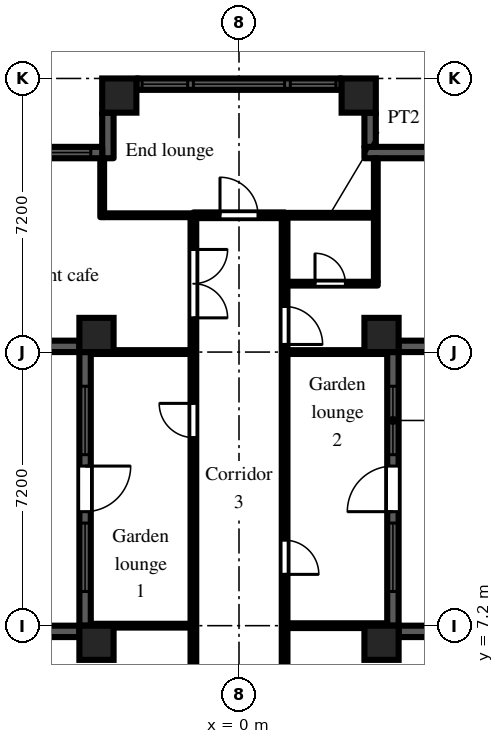
"""IFC4 building model, lengths in metres.
Left out: names, types, materials, properties, quantities, classifications, styles, units other than length and angle.
Written with IfcOpenShell. Run it as: python <this file> out.ifc"""

import sys

from ifc_helpers import new_model, si_unit, direction, frame, frame_2d, origin, origin_2d, place, context, subcontext, project, spatial, rectangle, extrude, element, fill, save


model = new_model("IFC4")
c1 = context("Model", 3, precision=1e-05, world=origin(), true_north=direction((0.0, 1.0)))
c2 = subcontext(c1, "Body", "Model", "MODEL_VIEW")
j1 = project(units=[si_unit("LENGTHUNIT", "METRE"), si_unit("PLANEANGLEUNIT", "RADIAN")], contexts=[c1])
p1 = place(None, origin())
s1 = spatial("IfcSite", under=j1, at=p1, CompositionType="ELEMENT")
p2 = place(p1, origin())
s2 = spatial("IfcBuilding", under=s1, at=p2, CompositionType="ELEMENT")
p3 = place(p2, frame((0.0, 0.0, 84.9)))
s3 = spatial("IfcBuildingStorey", under=s2, at=p3, CompositionType="ELEMENT", Elevation=84.9)
for number, where, z_axis, x_axis in (
    (1, (-3.75, 6.75, 0.0), (0.0, 0.0, 1.0), (1.0, 0.0, 0.0)),
    (2, (-3.75, 14.85, 0.0), (0.0, 0.0, 1.0), (1.0, 0.0, 0.0)),
    (3, (-3.15, 21.15, 0.0), (0.0, 0.0, 1.0), (1.0, 0.0, 0.0)),
    (4, (3.15, 21.15, 0.0), (0.0, 0.0, 1.0), (1.0, 0.0, 0.0)),
    (5, (3.75, 6.75, 0.0), (0.0, 0.0, 1.0), (1.0, 0.0, 0.0)),
    (6, (3.75, 14.85, 0.0), (0.0, 0.0, 1.0), (1.0, 0.0, 0.0)),
):
    element("IfcColumn", number, at=place(p3, frame(where, z_axis=z_axis, x_axis=x_axis)), inside=s3, PredefinedType="COLUMN", context=c2, shape_type="SweptSolid", body=[
        extrude(rectangle(XDim=0.9, YDim=0.9, at=origin_2d()), origin(), (0.0, 0.0, 1.0), 3.0),
    ])
p4 = place(p3, frame((7.2, 7.05, 0.0), z_axis=(0.0, 0.0, 1.0), x_axis=(-1.0, 0.0, 0.0)))
e7 = element("IfcWall", 7, at=p4, inside=s3, PredefinedType="SOLIDWALL", context=c2, shape_type="SweptSolid", body=[
    extrude(rectangle(XDim=3.0, YDim=0.3, at=frame_2d((1.5, 0.0))), origin(), (0.0, 0.0, 1.0), 2.1),
])
p5 = place(p3, frame((4.05, 7.2, 0.0), z_axis=(0.0, 0.0, 1.0), x_axis=(0.0, 1.0, 0.0)))
e8 = element("IfcWall", 8, at=p5, inside=s3, PredefinedType="SOLIDWALL", context=c2, shape_type="SweptSolid", body=[
    extrude(rectangle(XDim=7.2, YDim=0.3, at=frame_2d((3.6, 0.0))), origin(), (0.0, 0.0, 1.0), 2.1),
])
p6 = place(p5, frame((3.0, 0.0, 0.0)))
e9 = element("IfcOpeningElement", 9, at=p6, cuts=e8, PredefinedType="OPENING", context=c2, shape_type="SweptSolid", body=[
    extrude(rectangle(XDim=1.2, YDim=2.05, at=frame_2d((0.6, 1.025))), frame((0.0, 0.16, 0.0), z_axis=(0.0, -1.0, 0.0), x_axis=(1.0, 0.0, 0.0)), (0.0, 0.0, 1.0), 0.32),
])
p7 = place(p5, frame((0.9, 0.0, 0.2)))
e10 = element("IfcOpeningElement", 10, at=p7, cuts=e8, PredefinedType="OPENING", context=c2, shape_type="SweptSolid", body=[
    extrude(rectangle(XDim=1.8, YDim=1.85, at=frame_2d((0.9, 0.925))), frame((0.0, 0.16, 0.0), z_axis=(0.0, -1.0, 0.0), x_axis=(1.0, 0.0, 0.0)), (0.0, 0.0, 1.0), 0.32),
])
p8 = place(p5, frame((4.5, 0.0, 0.2)))
e11 = element("IfcOpeningElement", 11, at=p8, cuts=e8, PredefinedType="OPENING", context=c2, shape_type="SweptSolid", body=[
    extrude(rectangle(XDim=1.8, YDim=1.85, at=frame_2d((0.9, 0.925))), frame((0.0, 0.16, 0.0), z_axis=(0.0, -1.0, 0.0), x_axis=(1.0, 0.0, 0.0)), (0.0, 0.0, 1.0), 0.32),
])
p9 = place(p3, frame((4.2, 14.55, 0.0), z_axis=(0.0, 0.0, 1.0), x_axis=(1.0, 0.0, 0.0)))
e12 = element("IfcWall", 12, at=p9, inside=s3, PredefinedType="SOLIDWALL", context=c2, shape_type="SweptSolid", body=[
    extrude(rectangle(XDim=2.1, YDim=0.3, at=frame_2d((1.05, 0.0))), origin(), (0.0, 0.0, 1.0), 2.1),
])
p10 = place(p3, frame((5.1, 19.65, 0.0), z_axis=(0.0, 0.0, 1.0), x_axis=(-1.0, 0.0, 0.0)))
e13 = element("IfcWall", 13, at=p10, inside=s3, PredefinedType="SOLIDWALL", context=c2, shape_type="SweptSolid", body=[
    extrude(rectangle(XDim=1.8, YDim=0.3, at=frame_2d((0.9, 0.0))), origin(), (0.0, 0.0, 1.0), 2.575),
])
p11 = place(p3, frame((3.45, 19.8, 0.0), z_axis=(0.0, 0.0, 1.0), x_axis=(0.0, 1.0, 0.0)))
e14 = element("IfcWall", 14, at=p11, inside=s3, PredefinedType="SOLIDWALL", context=c2, shape_type="SweptSolid", body=[
    extrude(rectangle(XDim=0.9, YDim=0.3, at=frame_2d((0.45, 0.0))), origin(), (0.0, 0.0, 1.0), 2.575),
])
p12 = place(p3, frame((2.7, 21.45, 0.0), z_axis=(0.0, 0.0, 1.0), x_axis=(-1.0, 0.0, 0.0)))
e15 = element("IfcWall", 15, at=p12, inside=s3, PredefinedType="SOLIDWALL", context=c2, shape_type="SweptSolid", body=[
    extrude(rectangle(XDim=5.4, YDim=0.3, at=frame_2d((2.7, 0.0))), origin(), (0.0, 0.0, 1.0), 2.1),
])
p13 = place(p12, frame((1.5, 0.0, 0.2)))
e16 = element("IfcOpeningElement", 16, at=p13, cuts=e15, PredefinedType="OPENING", context=c2, shape_type="SweptSolid", body=[
    extrude(rectangle(XDim=2.4, YDim=1.85, at=frame_2d((1.2, 0.925))), frame((0.0, 0.16, 0.0), z_axis=(0.0, -1.0, 0.0), x_axis=(1.0, 0.0, 0.0)), (0.0, 0.0, 1.0), 0.32),
])
p14 = place(p12, frame((0.15, 0.0, 0.2)))
e17 = element("IfcOpeningElement", 17, at=p14, cuts=e15, PredefinedType="OPENING", context=c2, shape_type="SweptSolid", body=[
    extrude(rectangle(XDim=1.2, YDim=1.85, at=frame_2d((0.6, 0.925))), frame((0.0, 0.16, 0.0), z_axis=(0.0, -1.0, 0.0), x_axis=(1.0, 0.0, 0.0)), (0.0, 0.0, 1.0), 0.32),
])
p15 = place(p12, frame((4.05, 0.0, 0.2)))
e18 = element("IfcOpeningElement", 18, at=p15, cuts=e15, PredefinedType="OPENING", context=c2, shape_type="SweptSolid", body=[
    extrude(rectangle(XDim=1.2, YDim=1.85, at=frame_2d((0.6, 0.925))), frame((0.0, 0.16, 0.0), z_axis=(0.0, -1.0, 0.0), x_axis=(1.0, 0.0, 0.0)), (0.0, 0.0, 1.0), 0.32),
])
p16 = place(p3, frame((-3.45, 20.7, 0.0), z_axis=(0.0, 0.0, 1.0), x_axis=(0.0, -1.0, 0.0)))
e19 = element("IfcWall", 19, at=p16, inside=s3, PredefinedType="SOLIDWALL", context=c2, shape_type="SweptSolid", body=[
    extrude(rectangle(XDim=1.2, YDim=0.3, at=frame_2d((0.6, 0.0))), origin(), (0.0, 0.0, 1.0), 2.575),
])
p17 = place(p3, frame((-3.6, 19.65, 0.0), z_axis=(0.0, 0.0, 1.0), x_axis=(-1.0, 0.0, 0.0)))
e20 = element("IfcWall", 20, at=p17, inside=s3, PredefinedType="SOLIDWALL", context=c2, shape_type="SweptSolid", body=[
    extrude(rectangle(XDim=1.8, YDim=0.3, at=frame_2d((0.9, 0.0))), origin(), (0.0, 0.0, 1.0), 2.575),
])
p18 = place(p17, frame((0.3, 0.0, 0.2)))
e21 = element("IfcOpeningElement", 21, at=p18, cuts=e20, PredefinedType="OPENING", context=c2, shape_type="SweptSolid", body=[
    extrude(rectangle(XDim=1.2, YDim=1.85, at=frame_2d((0.6, 0.925))), frame((0.0, 0.16, 0.0), z_axis=(0.0, -1.0, 0.0), x_axis=(1.0, 0.0, 0.0)), (0.0, 0.0, 1.0), 0.32),
])
p19 = place(p3, frame((-6.3, 14.55, 0.0), z_axis=(0.0, 0.0, 1.0), x_axis=(1.0, 0.0, 0.0)))
e22 = element("IfcWall", 22, at=p19, inside=s3, PredefinedType="SOLIDWALL", context=c2, shape_type="SweptSolid", body=[
    extrude(rectangle(XDim=2.1, YDim=0.3, at=frame_2d((1.05, 0.0))), origin(), (0.0, 0.0, 1.0), 2.1),
])
p20 = place(p3, frame((-4.05, 14.4, 0.0), z_axis=(0.0, 0.0, 1.0), x_axis=(0.0, -1.0, 0.0)))
e23 = element("IfcWall", 23, at=p20, inside=s3, PredefinedType="SOLIDWALL", context=c2, shape_type="SweptSolid", body=[
    extrude(rectangle(XDim=7.2, YDim=0.3, at=frame_2d((3.6, 0.0))), origin(), (0.0, 0.0, 1.0), 2.1),
])
p21 = place(p20, frame((3.0, 0.0, 0.0)))
e24 = element("IfcOpeningElement", 24, at=p21, cuts=e23, PredefinedType="OPENING", context=c2, shape_type="SweptSolid", body=[
    extrude(rectangle(XDim=1.2, YDim=2.05, at=frame_2d((0.6, 1.025))), frame((0.0, 0.16, 0.0), z_axis=(0.0, -1.0, 0.0), x_axis=(1.0, 0.0, 0.0)), (0.0, 0.0, 1.0), 0.32),
])
p22 = place(p20, frame((0.9, 0.0, 0.2)))
e25 = element("IfcOpeningElement", 25, at=p22, cuts=e23, PredefinedType="OPENING", context=c2, shape_type="SweptSolid", body=[
    extrude(rectangle(XDim=1.8, YDim=1.85, at=frame_2d((0.9, 0.925))), frame((0.0, 0.16, 0.0), z_axis=(0.0, -1.0, 0.0), x_axis=(1.0, 0.0, 0.0)), (0.0, 0.0, 1.0), 0.32),
])
p23 = place(p20, frame((4.5, 0.0, 0.2)))
e26 = element("IfcOpeningElement", 26, at=p23, cuts=e23, PredefinedType="OPENING", context=c2, shape_type="SweptSolid", body=[
    extrude(rectangle(XDim=1.8, YDim=1.85, at=frame_2d((0.9, 0.925))), frame((0.0, 0.16, 0.0), z_axis=(0.0, -1.0, 0.0), x_axis=(1.0, 0.0, 0.0)), (0.0, 0.0, 1.0), 0.32),
])
p24 = place(p3, frame((-4.2, 7.05, 0.0), z_axis=(0.0, 0.0, 1.0), x_axis=(-1.0, 0.0, 0.0)))
e27 = element("IfcWall", 27, at=p24, inside=s3, PredefinedType="SOLIDWALL", context=c2, shape_type="SweptSolid", body=[
    extrude(rectangle(XDim=3.0, YDim=0.3, at=frame_2d((1.5, 0.0))), origin(), (0.0, 0.0, 1.0), 2.1),
])
for number, where, z_axis, x_axis in (
    (28, (-3.9, 7.2, 0.0), (0.0, 0.0, 1.0), (1.0, 0.0, 0.0)),
    (29, (-3.9, 14.4, 0.0), (0.0, 0.0, 1.0), (1.0, 0.0, 0.0)),
):
    element("IfcWall", number, at=place(p3, frame(where, z_axis=z_axis, x_axis=x_axis)), inside=s3, PredefinedType="PARTITIONING", context=c2, shape_type="SweptSolid", body=[
        extrude(rectangle(XDim=2.625, YDim=0.1, at=frame_2d((1.312, 0.0))), origin(), (0.0, 0.0, 1.0), 2.575),
    ])
p25 = place(p3, frame((-3.6, 17.95, 0.0), z_axis=(0.0, 0.0, 1.0), x_axis=(0.0, 1.0, 0.0)))
e30 = element("IfcWall", 30, at=p25, inside=s3, PredefinedType="PARTITIONING", context=c2, shape_type="SweptSolid", body=[
    extrude(rectangle(XDim=1.55, YDim=0.1, at=frame_2d((0.775, 0.0))), origin(), (0.0, 0.0, 1.0), 2.575),
])
p26 = place(p3, frame((-3.55, 18.0, 0.0), z_axis=(0.0, 0.0, 1.0), x_axis=(1.0, 0.0, 0.0)))
e31 = element("IfcWall", 31, at=p26, inside=s3, PredefinedType="PARTITIONING", context=c2, shape_type="SweptSolid", body=[
    extrude(rectangle(XDim=2.35, YDim=0.1, at=frame_2d((1.175, 0.0))), origin(), (0.0, 0.0, 1.0), 2.575),
])
p27 = place(p3, frame((-1.2, 1.275, 0.0), z_axis=(0.0, 0.0, 1.0), x_axis=(0.0, 1.0, 0.0)))
e32 = element("IfcWall", 32, at=p27, inside=s3, PredefinedType="PARTITIONING", context=c2, shape_type="SweptSolid", body=[
    extrude(rectangle(XDim=16.65, YDim=0.15, at=frame_2d((8.325, 0.0))), origin(), (0.0, 0.0, 1.0), 2.575),
])
p28 = place(p27, frame((2.475, 0.0, 0.0)))
e33 = element("IfcOpeningElement", 33, at=p28, cuts=e32, PredefinedType="OPENING", context=c2, shape_type="SweptSolid", body=[
    extrude(rectangle(XDim=0.9, YDim=2.1, at=frame_2d((0.45, 1.05))), frame((0.0, 0.085, 0.0), z_axis=(0.0, -1.0, 0.0), x_axis=(1.0, 0.0, 0.0)), (0.0, 0.0, 1.0), 0.17),
])
p29 = place(p27, frame((10.875, 0.0, 0.0)))
e34 = element("IfcOpeningElement", 34, at=p29, cuts=e32, PredefinedType="OPENING", context=c2, shape_type="SweptSolid", body=[
    extrude(rectangle(XDim=0.9, YDim=2.1, at=frame_2d((0.45, 1.05))), frame((0.0, 0.085, 0.0), z_axis=(0.0, -1.0, 0.0), x_axis=(1.0, 0.0, 0.0)), (0.0, 0.0, 1.0), 0.17),
])
p30 = place(p27, frame((14.025, 0.0, 0.0)))
e35 = element("IfcOpeningElement", 35, at=p30, cuts=e32, PredefinedType="OPENING", context=c2, shape_type="SweptSolid", body=[
    extrude(rectangle(XDim=1.8, YDim=2.1, at=frame_2d((0.9, 1.05))), frame((0.0, 0.085, 0.0), z_axis=(0.0, -1.0, 0.0), x_axis=(1.0, 0.0, 0.0)), (0.0, 0.0, 1.0), 0.17),
])
p31 = place(p3, frame((-1.2, 18.0, 0.0), z_axis=(0.0, 0.0, 1.0), x_axis=(1.0, 0.0, 0.0)))
e36 = element("IfcWall", 36, at=p31, inside=s3, PredefinedType="PARTITIONING", context=c2, shape_type="SweptSolid", body=[
    extrude(rectangle(XDim=2.4, YDim=0.15, at=frame_2d((1.2, 0.0))), origin(), (0.0, 0.0, 1.0), 2.575),
])
p32 = place(p31, frame((0.7, 0.0, 0.0)))
e37 = element("IfcOpeningElement", 37, at=p32, cuts=e36, PredefinedType="OPENING", context=c2, shape_type="SweptSolid", body=[
    extrude(rectangle(XDim=1.0, YDim=2.1, at=frame_2d((0.5, 1.05))), frame((0.0, 0.085, 0.0), z_axis=(0.0, -1.0, 0.0), x_axis=(1.0, 0.0, 0.0)), (0.0, 0.0, 1.0), 0.17),
])
p33 = place(p3, frame((1.2, 1.125, 0.0), z_axis=(0.0, 0.0, 1.0), x_axis=(0.0, 1.0, 0.0)))
e38 = element("IfcWall", 38, at=p33, inside=s3, PredefinedType="PARTITIONING", context=c2, shape_type="SweptSolid", body=[
    extrude(rectangle(XDim=16.8, YDim=0.15, at=frame_2d((8.4, 0.0))), origin(), (0.0, 0.0, 1.0), 2.575),
])
p34 = place(p33, frame((3.825, 0.0, 0.0)))
e39 = element("IfcOpeningElement", 39, at=p34, cuts=e38, PredefinedType="OPENING", context=c2, shape_type="SweptSolid", body=[
    extrude(rectangle(XDim=0.9, YDim=2.1, at=frame_2d((0.45, 1.05))), frame((0.0, 0.085, 0.0), z_axis=(0.0, -1.0, 0.0), x_axis=(1.0, 0.0, 0.0)), (0.0, 0.0, 1.0), 0.17),
])
p35 = place(p33, frame((7.425, 0.0, 0.0)))
e40 = element("IfcOpeningElement", 40, at=p35, cuts=e38, PredefinedType="OPENING", context=c2, shape_type="SweptSolid", body=[
    extrude(rectangle(XDim=0.9, YDim=2.1, at=frame_2d((0.45, 1.05))), frame((0.0, 0.085, 0.0), z_axis=(0.0, -1.0, 0.0), x_axis=(1.0, 0.0, 0.0)), (0.0, 0.0, 1.0), 0.17),
])
p36 = place(p33, frame((13.475, 0.0, 0.0)))
e41 = element("IfcOpeningElement", 41, at=p36, cuts=e38, PredefinedType="OPENING", context=c2, shape_type="SweptSolid", body=[
    extrude(rectangle(XDim=1.0, YDim=2.1, at=frame_2d((0.5, 1.05))), frame((0.0, 0.085, 0.0), z_axis=(0.0, -1.0, 0.0), x_axis=(1.0, 0.0, 0.0)), (0.0, 0.0, 1.0), 0.17),
])
p37 = place(p3, frame((1.275, 7.2, 0.0), z_axis=(0.0, 0.0, 1.0), x_axis=(1.0, 0.0, 0.0)))
e42 = element("IfcWall", 42, at=p37, inside=s3, PredefinedType="PARTITIONING", context=c2, shape_type="SweptSolid", body=[
    extrude(rectangle(XDim=2.625, YDim=0.125, at=frame_2d((1.312, 0.0))), origin(), (0.0, 0.0, 1.0), 2.575),
])
p38 = place(p3, frame((1.275, 14.4, 0.0), z_axis=(0.0, 0.0, 1.0), x_axis=(1.0, 0.0, 0.0)))
e43 = element("IfcWall", 43, at=p38, inside=s3, PredefinedType="PARTITIONING", context=c2, shape_type="SweptSolid", body=[
    extrude(rectangle(XDim=2.625, YDim=0.1, at=frame_2d((1.312, 0.0))), origin(), (0.0, 0.0, 1.0), 2.575),
])
p39 = place(p3, frame((1.275, 16.2, 0.0), z_axis=(0.0, 0.0, 1.0), x_axis=(1.0, 0.0, 0.0)))
e44 = element("IfcWall", 44, at=p39, inside=s3, PredefinedType="PARTITIONING", context=c2, shape_type="SweptSolid", body=[
    extrude(rectangle(XDim=2.375, YDim=0.1, at=frame_2d((1.188, 0.0))), origin(), (0.0, 0.0, 1.0), 2.575),
])
p40 = place(p39, frame((0.725, 0.0, 0.0)))
e45 = element("IfcOpeningElement", 45, at=p40, cuts=e44, PredefinedType="OPENING", context=c2, shape_type="SweptSolid", body=[
    extrude(rectangle(XDim=0.8, YDim=2.1, at=frame_2d((0.4, 1.05))), frame((0.0, 0.06, 0.0), z_axis=(0.0, -1.0, 0.0), x_axis=(1.0, 0.0, 0.0)), (0.0, 0.0, 1.0), 0.12),
])
p41 = place(p3, frame((1.2, 18.0, 0.0), z_axis=(0.0, 0.0, 1.0), x_axis=(1.0, 0.0, 0.0)))
e46 = element("IfcWall", 46, at=p41, inside=s3, PredefinedType="PARTITIONING", context=c2, shape_type="SweptSolid", body=[
    extrude(rectangle(XDim=2.35, YDim=0.125, at=frame_2d((1.175, 0.0))), origin(), (0.0, 0.0, 1.0), 2.575),
])
p42 = place(p3, frame((3.6, 16.25, 0.0), z_axis=(0.0, 0.0, 1.0), x_axis=(0.0, 1.0, 0.0)))
e47 = element("IfcWall", 47, at=p42, inside=s3, PredefinedType="PARTITIONING", context=c2, shape_type="SweptSolid", body=[
    extrude(rectangle(XDim=3.25, YDim=0.1, at=frame_2d((1.625, 0.0))), origin(), (0.0, 0.0, 1.0), 2.575),
])
p43 = place(p6, origin())
e48 = element("IfcDoor", 48, at=p43, inside=s3, OperationType="SINGLE_SWING_LEFT", PredefinedType="DOOR", context=c2, shape_type="SweptSolid", body=[
    extrude(rectangle(XDim=1.2, YDim=2.05, at=frame_2d((0.6, 1.025))), frame((0.0, 0.025, 0.0), z_axis=(0.0, -1.0, 0.0), x_axis=(1.0, 0.0, 0.0)), (0.0, 0.0, 1.0), 0.05),
])
fill(e9, e48)
p44 = place(p7, origin())
e49 = element("IfcWindow", 49, at=p44, inside=s3, PartitioningType="SINGLE_PANEL", PredefinedType="WINDOW", context=c2, shape_type="SweptSolid", body=[
    extrude(rectangle(XDim=1.8, YDim=1.85, at=frame_2d((0.9, 0.925))), frame((0.0, 0.03, 0.0), z_axis=(0.0, -1.0, 0.0), x_axis=(1.0, 0.0, 0.0)), (0.0, 0.0, 1.0), 0.06),
])
fill(e10, e49)
p45 = place(p8, origin())
e50 = element("IfcWindow", 50, at=p45, inside=s3, PartitioningType="SINGLE_PANEL", PredefinedType="WINDOW", context=c2, shape_type="SweptSolid", body=[
    extrude(rectangle(XDim=1.8, YDim=1.85, at=frame_2d((0.9, 0.925))), frame((0.0, 0.03, 0.0), z_axis=(0.0, -1.0, 0.0), x_axis=(1.0, 0.0, 0.0)), (0.0, 0.0, 1.0), 0.06),
])
fill(e11, e50)
p46 = place(p13, origin())
e51 = element("IfcWindow", 51, at=p46, inside=s3, PartitioningType="SINGLE_PANEL", PredefinedType="WINDOW", context=c2, shape_type="SweptSolid", body=[
    extrude(rectangle(XDim=2.4, YDim=1.85, at=frame_2d((1.2, 0.925))), frame((0.0, 0.03, 0.0), z_axis=(0.0, -1.0, 0.0), x_axis=(1.0, 0.0, 0.0)), (0.0, 0.0, 1.0), 0.06),
])
fill(e16, e51)
p47 = place(p14, origin())
e52 = element("IfcWindow", 52, at=p47, inside=s3, PartitioningType="SINGLE_PANEL", PredefinedType="WINDOW", context=c2, shape_type="SweptSolid", body=[
    extrude(rectangle(XDim=1.2, YDim=1.85, at=frame_2d((0.6, 0.925))), frame((0.0, 0.03, 0.0), z_axis=(0.0, -1.0, 0.0), x_axis=(1.0, 0.0, 0.0)), (0.0, 0.0, 1.0), 0.06),
])
fill(e17, e52)
p48 = place(p15, origin())
e53 = element("IfcWindow", 53, at=p48, inside=s3, PartitioningType="SINGLE_PANEL", PredefinedType="WINDOW", context=c2, shape_type="SweptSolid", body=[
    extrude(rectangle(XDim=1.2, YDim=1.85, at=frame_2d((0.6, 0.925))), frame((0.0, 0.03, 0.0), z_axis=(0.0, -1.0, 0.0), x_axis=(1.0, 0.0, 0.0)), (0.0, 0.0, 1.0), 0.06),
])
fill(e18, e53)
p49 = place(p18, origin())
e54 = element("IfcWindow", 54, at=p49, inside=s3, PartitioningType="SINGLE_PANEL", PredefinedType="WINDOW", context=c2, shape_type="SweptSolid", body=[
    extrude(rectangle(XDim=1.2, YDim=1.85, at=frame_2d((0.6, 0.925))), frame((0.0, 0.03, 0.0), z_axis=(0.0, -1.0, 0.0), x_axis=(1.0, 0.0, 0.0)), (0.0, 0.0, 1.0), 0.06),
])
fill(e21, e54)
p50 = place(p21, origin())
e55 = element("IfcDoor", 55, at=p50, inside=s3, OperationType="SINGLE_SWING_LEFT", PredefinedType="DOOR", context=c2, shape_type="SweptSolid", body=[
    extrude(rectangle(XDim=1.2, YDim=2.05, at=frame_2d((0.6, 1.025))), frame((0.0, 0.025, 0.0), z_axis=(0.0, -1.0, 0.0), x_axis=(1.0, 0.0, 0.0)), (0.0, 0.0, 1.0), 0.05),
])
fill(e24, e55)
p51 = place(p22, origin())
e56 = element("IfcWindow", 56, at=p51, inside=s3, PartitioningType="SINGLE_PANEL", PredefinedType="WINDOW", context=c2, shape_type="SweptSolid", body=[
    extrude(rectangle(XDim=1.8, YDim=1.85, at=frame_2d((0.9, 0.925))), frame((0.0, 0.03, 0.0), z_axis=(0.0, -1.0, 0.0), x_axis=(1.0, 0.0, 0.0)), (0.0, 0.0, 1.0), 0.06),
])
fill(e25, e56)
p52 = place(p23, origin())
e57 = element("IfcWindow", 57, at=p52, inside=s3, PartitioningType="SINGLE_PANEL", PredefinedType="WINDOW", context=c2, shape_type="SweptSolid", body=[
    extrude(rectangle(XDim=1.8, YDim=1.85, at=frame_2d((0.9, 0.925))), frame((0.0, 0.03, 0.0), z_axis=(0.0, -1.0, 0.0), x_axis=(1.0, 0.0, 0.0)), (0.0, 0.0, 1.0), 0.06),
])
fill(e26, e57)
p53 = place(p32, origin())
e58 = element("IfcDoor", 58, at=p53, inside=s3, OperationType="SINGLE_SWING_LEFT", PredefinedType="DOOR", context=c2, shape_type="SweptSolid", body=[
    extrude(rectangle(XDim=1.0, YDim=2.1, at=frame_2d((0.5, 1.05))), frame((0.0, 0.025, 0.0), z_axis=(0.0, -1.0, 0.0), x_axis=(1.0, 0.0, 0.0)), (0.0, 0.0, 1.0), 0.05),
])
fill(e37, e58)
p54 = place(p29, origin())
e59 = element("IfcDoor", 59, at=p54, inside=s3, OperationType="SINGLE_SWING_RIGHT", PredefinedType="DOOR", context=c2, shape_type="SweptSolid", body=[
    extrude(rectangle(XDim=0.9, YDim=2.1, at=frame_2d((0.45, 1.05))), frame((0.0, 0.025, 0.0), z_axis=(0.0, -1.0, 0.0), x_axis=(1.0, 0.0, 0.0)), (0.0, 0.0, 1.0), 0.05),
])
fill(e34, e59)
p55 = place(p30, frame((1.8, 0.0, 0.0), z_axis=(0.0, 0.0, 1.0), x_axis=(-1.0, 0.0, 0.0)))
e60 = element("IfcDoor", 60, at=p55, inside=s3, OperationType="DOUBLE_DOOR_DOUBLE_SWING", PredefinedType="DOOR", context=c2, shape_type="SweptSolid", body=[
    extrude(rectangle(XDim=1.8, YDim=2.1, at=frame_2d((0.9, 1.05))), frame((0.0, 0.025, 0.0), z_axis=(0.0, -1.0, 0.0), x_axis=(1.0, 0.0, 0.0)), (0.0, 0.0, 1.0), 0.05),
])
fill(e35, e60)
p56 = place(p35, frame((0.9, 0.0, 0.0), z_axis=(0.0, 0.0, 1.0), x_axis=(-1.0, 0.0, 0.0)))
e61 = element("IfcDoor", 61, at=p56, inside=s3, OperationType="SINGLE_SWING_RIGHT", PredefinedType="DOOR", context=c2, shape_type="SweptSolid", body=[
    extrude(rectangle(XDim=0.9, YDim=2.1, at=frame_2d((0.45, 1.05))), frame((0.0, 0.025, 0.0), z_axis=(0.0, -1.0, 0.0), x_axis=(1.0, 0.0, 0.0)), (0.0, 0.0, 1.0), 0.05),
])
fill(e40, e61)
p57 = place(p40, origin())
e62 = element("IfcDoor", 62, at=p57, inside=s3, OperationType="SINGLE_SWING_LEFT", PredefinedType="DOOR", context=c2, shape_type="SweptSolid", body=[
    extrude(rectangle(XDim=0.8, YDim=2.1, at=frame_2d((0.4, 1.05))), frame((0.0, 0.025, 0.0), z_axis=(0.0, -1.0, 0.0), x_axis=(1.0, 0.0, 0.0)), (0.0, 0.0, 1.0), 0.05),
])
fill(e45, e62)
p58 = place(p36, frame((1.0, 0.0, 0.0), z_axis=(0.0, 0.0, 1.0), x_axis=(-1.0, 0.0, 0.0)))
e63 = element("IfcDoor", 63, at=p58, inside=s3, OperationType="SINGLE_SWING_RIGHT", PredefinedType="DOOR", context=c2, shape_type="SweptSolid", body=[
    extrude(rectangle(XDim=1.0, YDim=2.1, at=frame_2d((0.5, 1.05))), frame((0.0, 0.025, 0.0), z_axis=(0.0, -1.0, 0.0), x_axis=(1.0, 0.0, 0.0)), (0.0, 0.0, 1.0), 0.05),
])
fill(e41, e63)
save(model, sys.argv[1])
